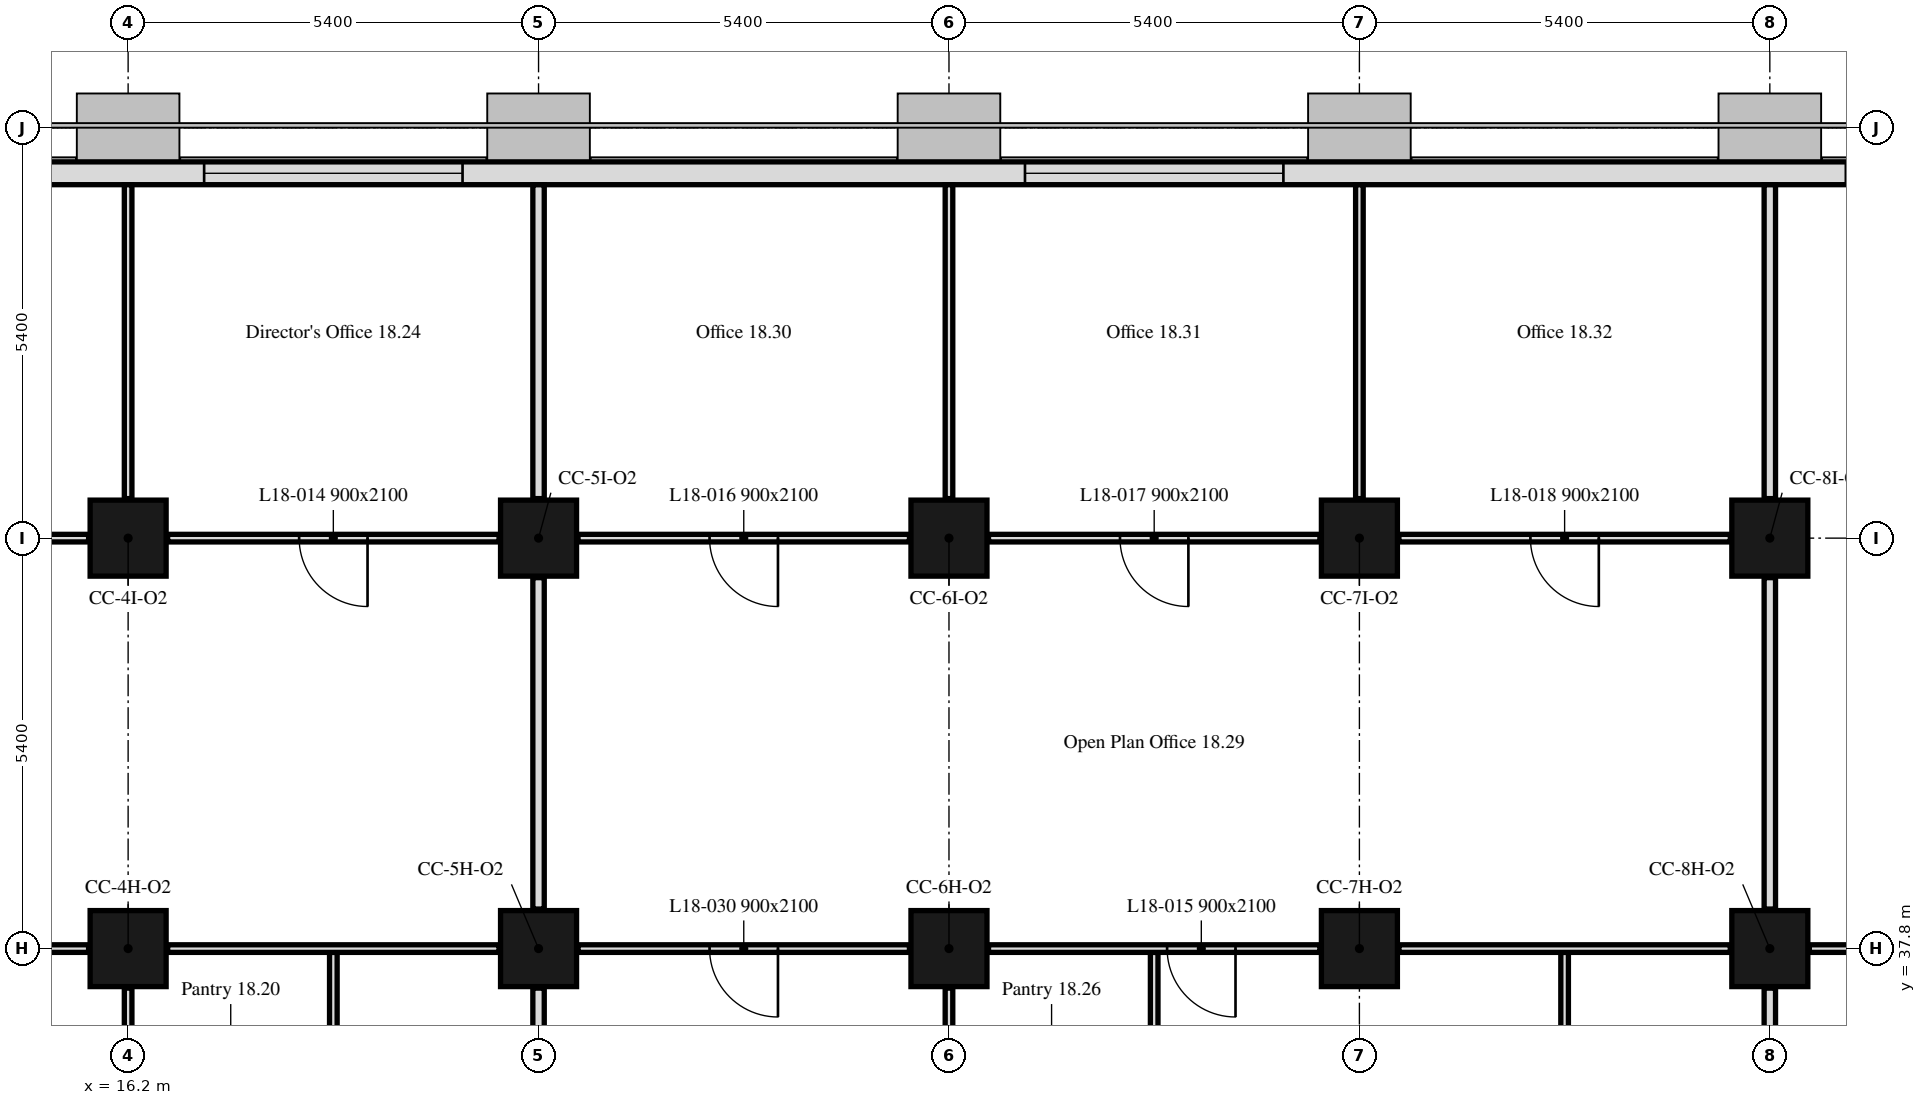
"""IFC4 building model, lengths in metres.
Left out: names, types, materials, properties, quantities, classifications, styles, units other than length and angle.
Written with IfcOpenShell. Run it as: python <this file> out.ifc"""

import sys

from ifc_helpers import new_model, si_unit, direction, frame, frame_2d, origin, origin_2d, place, context, subcontext, project, spatial, rectangle, extrude, element, fill, save


model = new_model("IFC4")
c1 = context("Model", 3, precision=1e-05, world=origin(), true_north=direction((0.0, 1.0)))
c2 = subcontext(c1, "Body", "Model", "MODEL_VIEW")
j1 = project(units=[si_unit("LENGTHUNIT", "METRE"), si_unit("PLANEANGLEUNIT", "RADIAN")], contexts=[c1])
p1 = place(None, origin())
s1 = spatial("IfcSite", under=j1, at=p1, CompositionType="ELEMENT")
p2 = place(p1, origin())
s2 = spatial("IfcBuilding", under=s1, at=p2, CompositionType="ELEMENT")
p3 = place(p2, frame((0.0, 0.0, 80.2)))
s3 = spatial("IfcBuildingStorey", under=s2, at=p3, CompositionType="ELEMENT", Elevation=80.2)
for number, where, z_axis, x_axis in (
    (1, (16.2, 37.8, 0.0), (0.0, 0.0, 1.0), (1.0, 0.0, 0.0)),
    (2, (21.6, 37.8, 0.0), (0.0, 0.0, 1.0), (1.0, 0.0, 0.0)),
    (3, (27.0, 37.8, 0.0), (0.0, 0.0, 1.0), (1.0, 0.0, 0.0)),
    (4, (32.4, 37.8, 0.0), (0.0, 0.0, 1.0), (1.0, 0.0, 0.0)),
    (5, (37.8, 37.8, 0.0), (0.0, 0.0, 1.0), (1.0, 0.0, 0.0)),
    (6, (16.2, 43.2, 0.0), (0.0, 0.0, 1.0), (1.0, 0.0, 0.0)),
    (7, (21.6, 43.2, 0.0), (0.0, 0.0, 1.0), (1.0, 0.0, 0.0)),
    (8, (27.0, 43.2, 0.0), (0.0, 0.0, 1.0), (1.0, 0.0, 0.0)),
    (9, (32.4, 43.2, 0.0), (0.0, 0.0, 1.0), (1.0, 0.0, 0.0)),
    (10, (37.8, 43.2, 0.0), (0.0, 0.0, 1.0), (1.0, 0.0, 0.0)),
):
    element("IfcColumn", number, at=place(p3, frame(where, z_axis=z_axis, x_axis=x_axis)), inside=s3, PredefinedType="COLUMN", context=c2, shape_type="SweptSolid", body=[
        extrude(rectangle(XDim=1.0, YDim=1.0, at=origin_2d()), origin(), (0.0, 0.0, 1.0), 3.5),
    ])
p4 = place(p3, frame((43.014, 48.0, 0.0), z_axis=(0.0, 0.0, 1.0), x_axis=(-1.0, 0.0, 0.0)))
e11 = element("IfcWall", 11, at=p4, inside=s3, PredefinedType="SOLIDWALL", context=c2, shape_type="SweptSolid", body=[
    extrude(rectangle(XDim=32.027, YDim=0.3, at=frame_2d((16.014, 0.0))), origin(), (0.0, 0.0, 1.0), 3.5),
])
p5 = place(p4, frame((0.814, 0.0, 0.9)))
e12 = element("IfcOpeningElement", 12, at=p5, cuts=e11, PredefinedType="OPENING", context=c2, shape_type="SweptSolid", body=[
    extrude(rectangle(XDim=3.4, YDim=1.7, at=frame_2d((1.7, 0.85))), frame((0.0, 0.16, 0.0), z_axis=(0.0, -1.0, 0.0), x_axis=(1.0, 0.0, 0.0)), (0.0, 0.0, 1.0), 0.32),
])
p6 = place(p4, frame((11.614, 0.0, 0.9)))
e13 = element("IfcOpeningElement", 13, at=p6, cuts=e11, PredefinedType="OPENING", context=c2, shape_type="SweptSolid", body=[
    extrude(rectangle(XDim=3.4, YDim=1.7, at=frame_2d((1.7, 0.85))), frame((0.0, 0.16, 0.0), z_axis=(0.0, -1.0, 0.0), x_axis=(1.0, 0.0, 0.0)), (0.0, 0.0, 1.0), 0.32),
])
p7 = place(p4, frame((22.414, 0.0, 0.9)))
e14 = element("IfcOpeningElement", 14, at=p7, cuts=e11, PredefinedType="OPENING", context=c2, shape_type="SweptSolid", body=[
    extrude(rectangle(XDim=3.4, YDim=1.7, at=frame_2d((1.7, 0.85))), frame((0.0, 0.16, 0.0), z_axis=(0.0, -1.0, 0.0), x_axis=(1.0, 0.0, 0.0)), (0.0, 0.0, 1.0), 0.32),
])
p8 = place(p3, frame((16.2, 35.175, 0.0), z_axis=(0.0, 0.0, 1.0), x_axis=(0.0, 1.0, 0.0)))
e15 = element("IfcWall", 15, at=p8, inside=s3, PredefinedType="PARTITIONING", context=c2, shape_type="SweptSolid", body=[
    extrude(rectangle(XDim=2.105, YDim=0.1, at=frame_2d((1.052, 0.0))), origin(), (0.0, 0.0, 1.0), 2.75),
])
p9 = place(p3, frame((15.68, 37.8, 0.0), z_axis=(0.0, 0.0, 1.0), x_axis=(-1.0, 0.0, 0.0)))
e16 = element("IfcWall", 16, at=p9, inside=s3, PredefinedType="PARTITIONING", context=c2, shape_type="SweptSolid", body=[
    extrude(rectangle(XDim=4.36, YDim=0.1, at=frame_2d((2.18, 0.0))), origin(), (0.0, 0.0, 1.0), 3.5),
])
p10 = place(p9, frame((1.73, 0.0, 0.0)))
e17 = element("IfcOpeningElement", 17, at=p10, cuts=e16, PredefinedType="OPENING", context=c2, shape_type="SweptSolid", body=[
    extrude(rectangle(XDim=0.9, YDim=2.1, at=frame_2d((0.45, 1.05))), frame((0.0, 0.05, 0.0), z_axis=(0.0, -1.0, 0.0), x_axis=(1.0, 0.0, 0.0)), (0.0, 0.0, 1.0), 0.1),
])
p11 = place(p3, frame((18.9, 35.175, 0.0), z_axis=(0.0, 0.0, 1.0), x_axis=(0.0, 1.0, 0.0)))
e18 = element("IfcWall", 18, at=p11, inside=s3, PredefinedType="PARTITIONING", context=c2, shape_type="SweptSolid", body=[
    extrude(rectangle(XDim=2.575, YDim=0.1, at=frame_2d((1.288, 0.0))), origin(), (0.0, 0.0, 1.0), 3.5),
])
p12 = place(p3, frame((21.6, 35.175, 0.0), z_axis=(0.0, 0.0, 1.0), x_axis=(0.0, 1.0, 0.0)))
e19 = element("IfcWall", 19, at=p12, inside=s3, PredefinedType="PARTITIONING", context=c2, shape_type="SweptSolid", body=[
    extrude(rectangle(XDim=2.105, YDim=0.15, at=frame_2d((1.052, 0.0))), origin(), (0.0, 0.0, 1.0), 2.75),
])
p13 = place(p3, frame((21.08, 37.8, 0.0), z_axis=(0.0, 0.0, 1.0), x_axis=(-1.0, 0.0, 0.0)))
e20 = element("IfcWall", 20, at=p13, inside=s3, PredefinedType="PARTITIONING", context=c2, shape_type="SweptSolid", body=[
    extrude(rectangle(XDim=4.36, YDim=0.1, at=frame_2d((2.18, 0.0))), origin(), (0.0, 0.0, 1.0), 3.5),
])
p14 = place(p3, frame((21.08, 43.2, 0.0), z_axis=(0.0, 0.0, 1.0), x_axis=(-1.0, 0.0, 0.0)))
e21 = element("IfcWall", 21, at=p14, inside=s3, PredefinedType="PARTITIONING", context=c2, shape_type="SweptSolid", body=[
    extrude(rectangle(XDim=4.36, YDim=0.1, at=frame_2d((2.18, 0.0))), origin(), (0.0, 0.0, 1.0), 3.5),
])
p15 = place(p14, frame((1.73, 0.0, 0.0)))
e22 = element("IfcOpeningElement", 22, at=p15, cuts=e21, PredefinedType="OPENING", context=c2, shape_type="SweptSolid", body=[
    extrude(rectangle(XDim=0.9, YDim=2.1, at=frame_2d((0.45, 1.05))), frame((0.0, 0.05, 0.0), z_axis=(0.0, -1.0, 0.0), x_axis=(1.0, 0.0, 0.0)), (0.0, 0.0, 1.0), 0.1),
])
p16 = place(p3, frame((15.68, 43.2, 0.0), z_axis=(0.0, 0.0, 1.0), x_axis=(-1.0, 0.0, 0.0)))
e23 = element("IfcWall", 23, at=p16, inside=s3, PredefinedType="PARTITIONING", context=c2, shape_type="SweptSolid", body=[
    extrude(rectangle(XDim=4.36, YDim=0.1, at=frame_2d((2.18, 0.0))), origin(), (0.0, 0.0, 1.0), 3.5),
])
p17 = place(p16, frame((1.73, 0.0, 0.0)))
e24 = element("IfcOpeningElement", 24, at=p17, cuts=e23, PredefinedType="OPENING", context=c2, shape_type="SweptSolid", body=[
    extrude(rectangle(XDim=0.9, YDim=2.1, at=frame_2d((0.45, 1.05))), frame((0.0, 0.05, 0.0), z_axis=(0.0, -1.0, 0.0), x_axis=(1.0, 0.0, 0.0)), (0.0, 0.0, 1.0), 0.1),
])
p18 = place(p3, frame((21.6, 38.32, 0.0), z_axis=(0.0, 0.0, 1.0), x_axis=(0.0, 1.0, 0.0)))
e25 = element("IfcWall", 25, at=p18, inside=s3, PredefinedType="PARTITIONING", context=c2, shape_type="SweptSolid", body=[
    extrude(rectangle(XDim=4.36, YDim=0.15, at=frame_2d((2.18, 0.0))), origin(), (0.0, 0.0, 1.0), 2.75),
])
p19 = place(p3, frame((16.2, 43.72, 0.0), z_axis=(0.0, 0.0, 1.0), x_axis=(0.0, 1.0, 0.0)))
e26 = element("IfcWall", 26, at=p19, inside=s3, PredefinedType="PARTITIONING", context=c2, shape_type="SweptSolid", body=[
    extrude(rectangle(XDim=4.129, YDim=0.1, at=frame_2d((2.064, 0.0))), origin(), (0.0, 0.0, 1.0), 2.75),
])
p20 = place(p3, frame((21.6, 43.72, 0.0), z_axis=(0.0, 0.0, 1.0), x_axis=(0.0, 1.0, 0.0)))
e27 = element("IfcWall", 27, at=p20, inside=s3, PredefinedType="PARTITIONING", context=c2, shape_type="SweptSolid", body=[
    extrude(rectangle(XDim=4.129, YDim=0.15, at=frame_2d((2.064, 0.0))), origin(), (0.0, 0.0, 1.0), 2.75),
])
p21 = place(p3, frame((27.0, 35.175, 0.0), z_axis=(0.0, 0.0, 1.0), x_axis=(0.0, 1.0, 0.0)))
e28 = element("IfcWall", 28, at=p21, inside=s3, PredefinedType="PARTITIONING", context=c2, shape_type="SweptSolid", body=[
    extrude(rectangle(XDim=2.105, YDim=0.1, at=frame_2d((1.052, 0.0))), origin(), (0.0, 0.0, 1.0), 2.75),
])
p22 = place(p3, frame((26.48, 37.8, 0.0), z_axis=(0.0, 0.0, 1.0), x_axis=(-1.0, 0.0, 0.0)))
e29 = element("IfcWall", 29, at=p22, inside=s3, PredefinedType="PARTITIONING", context=c2, shape_type="SweptSolid", body=[
    extrude(rectangle(XDim=4.36, YDim=0.1, at=frame_2d((2.18, 0.0))), origin(), (0.0, 0.0, 1.0), 3.5),
])
p23 = place(p22, frame((1.73, 0.0, 0.0)))
e30 = element("IfcOpeningElement", 30, at=p23, cuts=e29, PredefinedType="OPENING", context=c2, shape_type="SweptSolid", body=[
    extrude(rectangle(XDim=0.9, YDim=2.1, at=frame_2d((0.45, 1.05))), frame((0.0, 0.05, 0.0), z_axis=(0.0, -1.0, 0.0), x_axis=(1.0, 0.0, 0.0)), (0.0, 0.0, 1.0), 0.1),
])
for number, where, z_axis, x_axis in (
    (31, (29.7, 35.175, 0.0), (0.0, 0.0, 1.0), (0.0, 1.0, 0.0)),
    (32, (35.1, 35.175, 0.0), (0.0, 0.0, 1.0), (0.0, 1.0, 0.0)),
):
    element("IfcWall", number, at=place(p3, frame(where, z_axis=z_axis, x_axis=x_axis)), inside=s3, PredefinedType="PARTITIONING", context=c2, shape_type="SweptSolid", body=[
        extrude(rectangle(XDim=2.575, YDim=0.1, at=frame_2d((1.288, 0.0))), origin(), (0.0, 0.0, 1.0), 3.5),
    ])
p24 = place(p3, frame((31.88, 37.8, 0.0), z_axis=(0.0, 0.0, 1.0), x_axis=(-1.0, 0.0, 0.0)))
e33 = element("IfcWall", 33, at=p24, inside=s3, PredefinedType="PARTITIONING", context=c2, shape_type="SweptSolid", body=[
    extrude(rectangle(XDim=4.36, YDim=0.1, at=frame_2d((2.18, 0.0))), origin(), (0.0, 0.0, 1.0), 3.5),
])
p25 = place(p24, frame((1.11, 0.0, 0.0)))
e34 = element("IfcOpeningElement", 34, at=p25, cuts=e33, PredefinedType="OPENING", context=c2, shape_type="SweptSolid", body=[
    extrude(rectangle(XDim=0.9, YDim=2.1, at=frame_2d((0.45, 1.05))), frame((0.0, 0.05, 0.0), z_axis=(0.0, -1.0, 0.0), x_axis=(1.0, 0.0, 0.0)), (0.0, 0.0, 1.0), 0.1),
])
p26 = place(p3, frame((37.8, 35.175, 0.0), z_axis=(0.0, 0.0, 1.0), x_axis=(0.0, 1.0, 0.0)))
e35 = element("IfcWall", 35, at=p26, inside=s3, PredefinedType="PARTITIONING", context=c2, shape_type="SweptSolid", body=[
    extrude(rectangle(XDim=2.105, YDim=0.15, at=frame_2d((1.052, 0.0))), origin(), (0.0, 0.0, 1.0), 2.75),
])
p27 = place(p3, frame((37.28, 37.8, 0.0), z_axis=(0.0, 0.0, 1.0), x_axis=(-1.0, 0.0, 0.0)))
e36 = element("IfcWall", 36, at=p27, inside=s3, PredefinedType="PARTITIONING", context=c2, shape_type="SweptSolid", body=[
    extrude(rectangle(XDim=4.36, YDim=0.1, at=frame_2d((2.18, 0.0))), origin(), (0.0, 0.0, 1.0), 2.75),
])
p28 = place(p3, frame((37.8, 38.32, 0.0), z_axis=(0.0, 0.0, 1.0), x_axis=(0.0, 1.0, 0.0)))
e37 = element("IfcWall", 37, at=p28, inside=s3, PredefinedType="PARTITIONING", context=c2, shape_type="SweptSolid", body=[
    extrude(rectangle(XDim=4.36, YDim=0.15, at=frame_2d((2.18, 0.0))), origin(), (0.0, 0.0, 1.0), 2.75),
])
p29 = place(p3, frame((37.28, 43.2, 0.0), z_axis=(0.0, 0.0, 1.0), x_axis=(-1.0, 0.0, 0.0)))
e38 = element("IfcWall", 38, at=p29, inside=s3, PredefinedType="PARTITIONING", context=c2, shape_type="SweptSolid", body=[
    extrude(rectangle(XDim=4.36, YDim=0.1, at=frame_2d((2.18, 0.0))), origin(), (0.0, 0.0, 1.0), 3.5),
])
p30 = place(p29, frame((1.73, 0.0, 0.0)))
e39 = element("IfcOpeningElement", 39, at=p30, cuts=e38, PredefinedType="OPENING", context=c2, shape_type="SweptSolid", body=[
    extrude(rectangle(XDim=0.9, YDim=2.1, at=frame_2d((0.45, 1.05))), frame((0.0, 0.05, 0.0), z_axis=(0.0, -1.0, 0.0), x_axis=(1.0, 0.0, 0.0)), (0.0, 0.0, 1.0), 0.1),
])
p31 = place(p3, frame((31.88, 43.2, 0.0), z_axis=(0.0, 0.0, 1.0), x_axis=(-1.0, 0.0, 0.0)))
e40 = element("IfcWall", 40, at=p31, inside=s3, PredefinedType="PARTITIONING", context=c2, shape_type="SweptSolid", body=[
    extrude(rectangle(XDim=4.36, YDim=0.1, at=frame_2d((2.18, 0.0))), origin(), (0.0, 0.0, 1.0), 3.5),
])
p32 = place(p31, frame((1.73, 0.0, 0.0)))
e41 = element("IfcOpeningElement", 41, at=p32, cuts=e40, PredefinedType="OPENING", context=c2, shape_type="SweptSolid", body=[
    extrude(rectangle(XDim=0.9, YDim=2.1, at=frame_2d((0.45, 1.05))), frame((0.0, 0.05, 0.0), z_axis=(0.0, -1.0, 0.0), x_axis=(1.0, 0.0, 0.0)), (0.0, 0.0, 1.0), 0.1),
])
p33 = place(p3, frame((26.48, 43.2, 0.0), z_axis=(0.0, 0.0, 1.0), x_axis=(-1.0, 0.0, 0.0)))
e42 = element("IfcWall", 42, at=p33, inside=s3, PredefinedType="PARTITIONING", context=c2, shape_type="SweptSolid", body=[
    extrude(rectangle(XDim=4.36, YDim=0.1, at=frame_2d((2.18, 0.0))), origin(), (0.0, 0.0, 1.0), 3.5),
])
p34 = place(p33, frame((1.73, 0.0, 0.0)))
e43 = element("IfcOpeningElement", 43, at=p34, cuts=e42, PredefinedType="OPENING", context=c2, shape_type="SweptSolid", body=[
    extrude(rectangle(XDim=0.9, YDim=2.1, at=frame_2d((0.45, 1.05))), frame((0.0, 0.05, 0.0), z_axis=(0.0, -1.0, 0.0), x_axis=(1.0, 0.0, 0.0)), (0.0, 0.0, 1.0), 0.1),
])
for number, where, z_axis, x_axis in (
    (44, (27.0, 43.72, 0.0), (0.0, 0.0, 1.0), (0.0, 1.0, 0.0)),
    (45, (32.4, 43.72, 0.0), (0.0, 0.0, 1.0), (0.0, 1.0, 0.0)),
):
    element("IfcWall", number, at=place(p3, frame(where, z_axis=z_axis, x_axis=x_axis)), inside=s3, PredefinedType="PARTITIONING", context=c2, shape_type="SweptSolid", body=[
        extrude(rectangle(XDim=4.129, YDim=0.1, at=frame_2d((2.064, 0.0))), origin(), (0.0, 0.0, 1.0), 2.75),
    ])
p35 = place(p3, frame((37.8, 43.72, 0.0), z_axis=(0.0, 0.0, 1.0), x_axis=(0.0, 1.0, 0.0)))
e46 = element("IfcWall", 46, at=p35, inside=s3, PredefinedType="PARTITIONING", context=c2, shape_type="SweptSolid", body=[
    extrude(rectangle(XDim=4.129, YDim=0.15, at=frame_2d((2.064, 0.0))), origin(), (0.0, 0.0, 1.0), 2.75),
])
p36 = place(p3, frame((42.68, 37.8, 0.0), z_axis=(0.0, 0.0, 1.0), x_axis=(-1.0, 0.0, 0.0)))
e47 = element("IfcWall", 47, at=p36, inside=s3, PredefinedType="PARTITIONING", context=c2, shape_type="SweptSolid", body=[
    extrude(rectangle(XDim=4.36, YDim=0.1, at=frame_2d((2.18, 0.0))), origin(), (0.0, 0.0, 1.0), 2.75),
])
p37 = place(p36, frame((1.73, 0.0, 0.0)))
e48 = element("IfcOpeningElement", 48, at=p37, cuts=e47, PredefinedType="OPENING", context=c2, shape_type="SweptSolid", body=[
    extrude(rectangle(XDim=0.9, YDim=2.1, at=frame_2d((0.45, 1.05))), frame((0.0, 0.05, 0.0), z_axis=(0.0, -1.0, 0.0), x_axis=(1.0, 0.0, 0.0)), (0.0, 0.0, 1.0), 0.1),
])
p38 = place(p6, origin())
e49 = element("IfcWindow", 49, at=p38, inside=s3, PartitioningType="SINGLE_PANEL", PredefinedType="WINDOW", context=c2, shape_type="SweptSolid", body=[
    extrude(rectangle(XDim=3.4, YDim=1.7, at=frame_2d((1.7, 0.85))), frame((0.0, 0.03, 0.0), z_axis=(0.0, -1.0, 0.0), x_axis=(1.0, 0.0, 0.0)), (0.0, 0.0, 1.0), 0.06),
])
fill(e13, e49)
p39 = place(p7, origin())
e50 = element("IfcWindow", 50, at=p39, inside=s3, PartitioningType="SINGLE_PANEL", PredefinedType="WINDOW", context=c2, shape_type="SweptSolid", body=[
    extrude(rectangle(XDim=3.4, YDim=1.7, at=frame_2d((1.7, 0.85))), frame((0.0, 0.03, 0.0), z_axis=(0.0, -1.0, 0.0), x_axis=(1.0, 0.0, 0.0)), (0.0, 0.0, 1.0), 0.06),
])
fill(e14, e50)
p40 = place(p15, origin())
e51 = element("IfcDoor", 51, at=p40, inside=s3, OperationType="SINGLE_SWING_LEFT", PredefinedType="DOOR", context=c2, shape_type="SweptSolid", body=[
    extrude(rectangle(XDim=0.9, YDim=2.1, at=frame_2d((0.45, 1.05))), frame((0.0, 0.025, 0.0), z_axis=(0.0, -1.0, 0.0), x_axis=(1.0, 0.0, 0.0)), (0.0, 0.0, 1.0), 0.05),
])
fill(e22, e51)
p41 = place(p25, origin())
e52 = element("IfcDoor", 52, at=p41, inside=s3, OperationType="SINGLE_SWING_RIGHT", PredefinedType="DOOR", context=c2, shape_type="SweptSolid", body=[
    extrude(rectangle(XDim=0.9, YDim=2.1, at=frame_2d((0.45, 1.05))), frame((0.0, 0.025, 0.0), z_axis=(0.0, -1.0, 0.0), x_axis=(1.0, 0.0, 0.0)), (0.0, 0.0, 1.0), 0.05),
])
fill(e34, e52)
p42 = place(p34, origin())
e53 = element("IfcDoor", 53, at=p42, inside=s3, OperationType="SINGLE_SWING_RIGHT", PredefinedType="DOOR", context=c2, shape_type="SweptSolid", body=[
    extrude(rectangle(XDim=0.9, YDim=2.1, at=frame_2d((0.45, 1.05))), frame((0.0, 0.025, 0.0), z_axis=(0.0, -1.0, 0.0), x_axis=(1.0, 0.0, 0.0)), (0.0, 0.0, 1.0), 0.05),
])
fill(e43, e53)
p43 = place(p32, origin())
e54 = element("IfcDoor", 54, at=p43, inside=s3, OperationType="SINGLE_SWING_RIGHT", PredefinedType="DOOR", context=c2, shape_type="SweptSolid", body=[
    extrude(rectangle(XDim=0.9, YDim=2.1, at=frame_2d((0.45, 1.05))), frame((0.0, 0.025, 0.0), z_axis=(0.0, -1.0, 0.0), x_axis=(1.0, 0.0, 0.0)), (0.0, 0.0, 1.0), 0.05),
])
fill(e41, e54)
p44 = place(p30, origin())
e55 = element("IfcDoor", 55, at=p44, inside=s3, OperationType="SINGLE_SWING_RIGHT", PredefinedType="DOOR", context=c2, shape_type="SweptSolid", body=[
    extrude(rectangle(XDim=0.9, YDim=2.1, at=frame_2d((0.45, 1.05))), frame((0.0, 0.025, 0.0), z_axis=(0.0, -1.0, 0.0), x_axis=(1.0, 0.0, 0.0)), (0.0, 0.0, 1.0), 0.05),
])
fill(e39, e55)
p45 = place(p23, origin())
e56 = element("IfcDoor", 56, at=p45, inside=s3, OperationType="SINGLE_SWING_LEFT", PredefinedType="DOOR", context=c2, shape_type="SweptSolid", body=[
    extrude(rectangle(XDim=0.9, YDim=2.1, at=frame_2d((0.45, 1.05))), frame((0.0, 0.025, 0.0), z_axis=(0.0, -1.0, 0.0), x_axis=(1.0, 0.0, 0.0)), (0.0, 0.0, 1.0), 0.05),
])
fill(e30, e56)
save(model, sys.argv[1])
